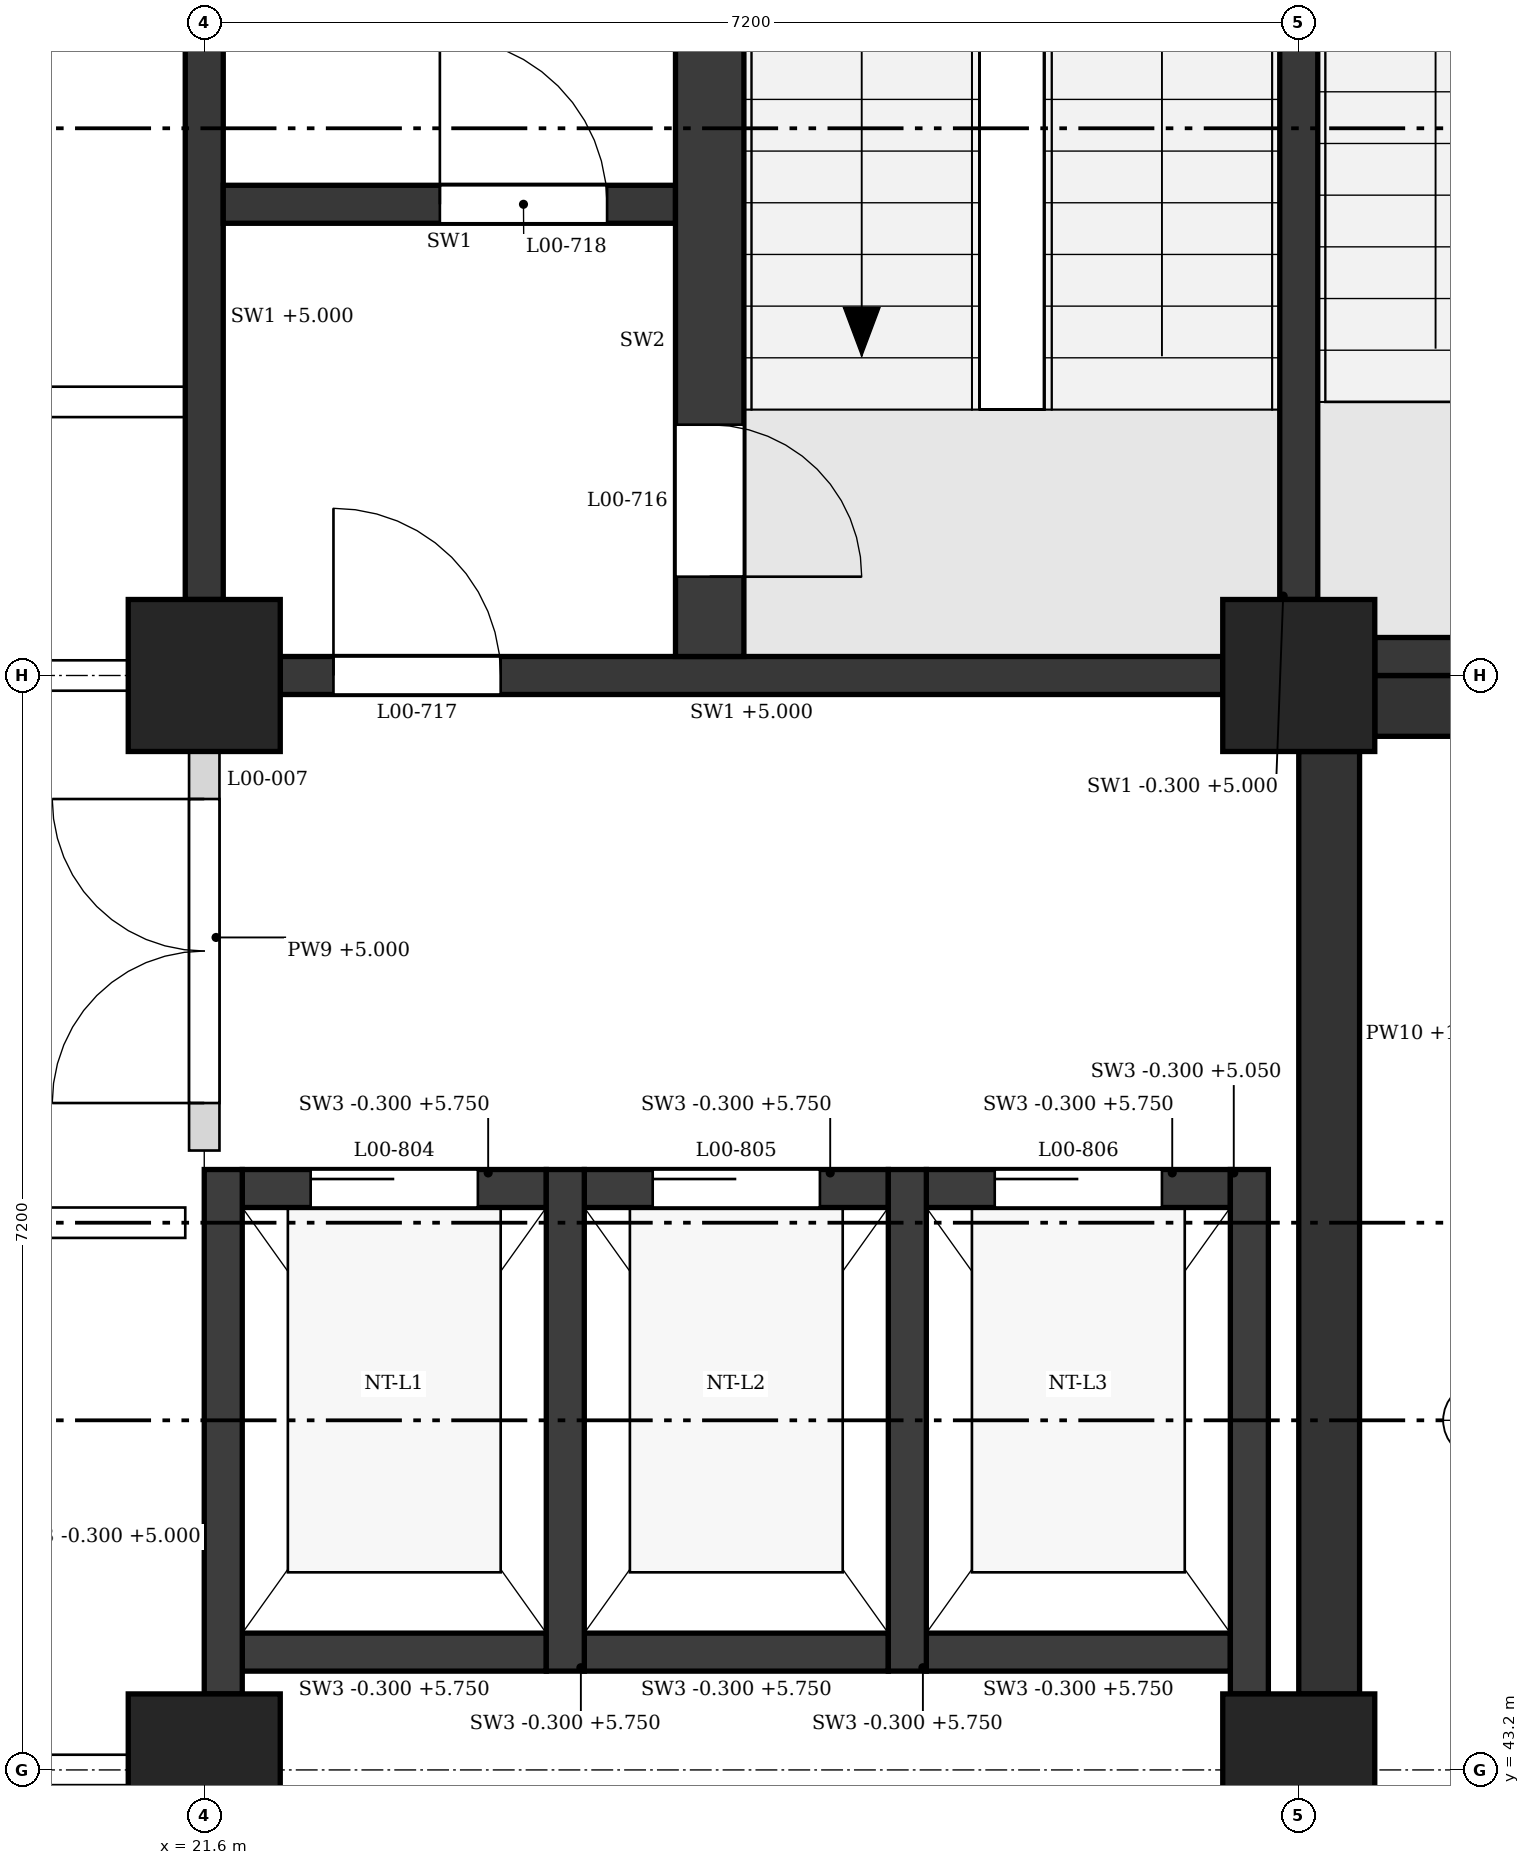
"""IFC4 building model, lengths in metres.
Left out: names, types, materials, properties, quantities, classifications, styles, units other than length and angle.
Written with IfcOpenShell. Run it as: python <this file> out.ifc"""

import sys

from ifc_helpers import new_model, si_unit, direction, frame, frame_2d, origin, origin_2d, place, context, subcontext, project, spatial, polyline, rectangle, outline, extrude, element, fill, save


model = new_model("IFC4")
c1 = context("Model", 3, precision=1e-05, world=origin(), true_north=direction((0.0, 1.0)))
c2 = subcontext(c1, "Body", "Model", "MODEL_VIEW")
j1 = project(units=[si_unit("LENGTHUNIT", "METRE"), si_unit("PLANEANGLEUNIT", "RADIAN")], contexts=[c1])
p1 = place(None, origin())
s1 = spatial("IfcSite", under=j1, at=p1, CompositionType="ELEMENT")
p2 = place(p1, origin())
s2 = spatial("IfcBuilding", under=s1, at=p2, CompositionType="ELEMENT")
p3 = place(p2, origin())
s3 = spatial("IfcBuildingStorey", under=s2, at=p3, CompositionType="ELEMENT", Elevation=0.0)
for number, where, z_axis, x_axis in (
    (1, (21.6, 43.2, 0.0), (0.0, 0.0, 1.0), (1.0, 0.0, 0.0)),
    (2, (21.6, 50.4, 0.0), (0.0, 0.0, 1.0), (1.0, 0.0, 0.0)),
    (3, (28.8, 43.2, 0.0), (0.0, 0.0, 1.0), (1.0, 0.0, 0.0)),
    (4, (28.8, 50.4, 0.0), (0.0, 0.0, 1.0), (1.0, 0.0, 0.0)),
):
    element("IfcColumn", number, at=place(p3, frame(where, z_axis=z_axis, x_axis=x_axis)), inside=s3, PredefinedType="COLUMN", context=c2, shape_type="SweptSolid", body=[
        extrude(rectangle(XDim=1.0, YDim=1.0, at=origin_2d()), origin(), (0.0, 0.0, 1.0), 6.0),
    ])
p4 = place(p3, frame((29.3, 50.525, 0.0), z_axis=(0.0, 0.0, 1.0), x_axis=(1.0, 0.0, 0.0)))
e5 = element("IfcWall", 5, at=p4, inside=s3, PredefinedType="SHEAR", context=c2, shape_type="SweptSolid", body=[
    extrude(rectangle(XDim=6.275, YDim=0.25, at=frame_2d((3.137, 0.0))), origin(), (0.0, 0.0, 1.0), 5.05),
])
p5 = place(p3, frame((28.8, 50.9, -0.3), z_axis=(0.0, 0.0, 1.0), x_axis=(0.0, 1.0, 0.0)))
e6 = element("IfcWall", 6, at=p5, inside=s3, PredefinedType="SHEAR", context=c2, shape_type="SweptSolid", body=[
    extrude(rectangle(XDim=6.2, YDim=0.25, at=frame_2d((3.1, 0.0))), origin(), (0.0, 0.0, 1.0), 5.3),
])
p6 = place(p3, frame((22.1, 50.4, 0.0), z_axis=(0.0, 0.0, 1.0), x_axis=(1.0, 0.0, 0.0)))
e7 = element("IfcWall", 7, at=p6, inside=s3, PredefinedType="SHEAR", context=c2, shape_type="SweptSolid", body=[
    extrude(rectangle(XDim=6.2, YDim=0.25, at=frame_2d((3.1, 0.0))), origin(), (0.0, 0.0, 1.0), 5.0),
])
p7 = place(p6, frame((0.35, 0.0, 0.0)))
e8 = element("IfcOpeningElement", 8, at=p7, cuts=e7, PredefinedType="OPENING", context=c2, shape_type="SweptSolid", body=[
    extrude(rectangle(XDim=1.1, YDim=2.1, at=frame_2d((0.55, 1.05))), frame((0.0, 0.135, 0.0), z_axis=(0.0, -1.0, 0.0), x_axis=(1.0, 0.0, 0.0)), (0.0, 0.0, 1.0), 0.27),
])
p8 = place(p3, frame((21.6, 50.9, 0.0), z_axis=(0.0, 0.0, 1.0), x_axis=(0.0, 1.0, 0.0)))
e9 = element("IfcWall", 9, at=p8, inside=s3, PredefinedType="SHEAR", context=c2, shape_type="SweptSolid", body=[
    extrude(rectangle(XDim=6.2, YDim=0.25, at=frame_2d((3.1, 0.0))), origin(), (0.0, 0.0, 1.0), 5.0),
])
p9 = place(p3, frame((24.925, 50.525, 0.0), z_axis=(0.0, 0.0, 1.0), x_axis=(0.0, 1.0, 0.0)))
e10 = element("IfcWall", 10, at=p9, inside=s3, PredefinedType="SHEAR", context=c2, shape_type="SweptSolid", body=[
    extrude(rectangle(XDim=6.925, YDim=0.45, at=frame_2d((3.462, 0.0))), origin(), (0.0, 0.0, 1.0), 5.75),
])
p10 = place(p9, frame((0.525, 0.0, 0.0)))
e11 = element("IfcOpeningElement", 11, at=p10, cuts=e10, PredefinedType="OPENING", context=c2, shape_type="SweptSolid", body=[
    extrude(rectangle(XDim=1.0, YDim=2.1, at=frame_2d((0.5, 1.05))), frame((0.0, 0.235, 0.0), z_axis=(0.0, -1.0, 0.0), x_axis=(1.0, 0.0, 0.0)), (0.0, 0.0, 1.0), 0.47),
])
p11 = place(p3, frame((21.725, 53.5, 0.0), z_axis=(0.0, 0.0, 1.0), x_axis=(1.0, 0.0, 0.0)))
e12 = element("IfcWall", 12, at=p11, inside=s3, PredefinedType="SHEAR", context=c2, shape_type="SweptSolid", body=[
    extrude(rectangle(XDim=2.975, YDim=0.25, at=frame_2d((1.487, 0.0))), origin(), (0.0, 0.0, 1.0), 5.75),
])
p12 = place(p11, frame((1.425, 0.0, 0.0)))
e13 = element("IfcOpeningElement", 13, at=p12, cuts=e12, PredefinedType="OPENING", context=c2, shape_type="SweptSolid", body=[
    extrude(rectangle(XDim=1.1, YDim=2.1, at=frame_2d((0.55, 1.05))), frame((0.0, 0.135, 0.0), z_axis=(0.0, -1.0, 0.0), x_axis=(1.0, 0.0, 0.0)), (0.0, 0.0, 1.0), 0.27),
])
p13 = place(p3, frame((21.725, 43.7, -0.3), z_axis=(0.0, 0.0, 1.0), x_axis=(0.0, 1.0, 0.0)))
e14 = element("IfcWall", 14, at=p13, inside=s3, PredefinedType="SHEAR", context=c2, shape_type="SweptSolid", body=[
    extrude(rectangle(XDim=3.45, YDim=0.25, at=frame_2d((1.725, 0.0))), origin(), (0.0, 0.0, 1.0), 5.3),
])
for number, where, z_axis, x_axis in (
    (15, (23.975, 43.85, -0.3), (0.0, 0.0, 1.0), (0.0, 1.0, 0.0)),
    (16, (26.225, 43.85, -0.3), (0.0, 0.0, 1.0), (0.0, 1.0, 0.0)),
):
    element("IfcWall", number, at=place(p3, frame(where, z_axis=z_axis, x_axis=x_axis)), inside=s3, PredefinedType="SHEAR", context=c2, shape_type="SweptSolid", body=[
        extrude(rectangle(XDim=3.3, YDim=0.25, at=frame_2d((1.65, 0.0))), origin(), (0.0, 0.0, 1.0), 6.05),
    ])
p14 = place(p3, frame((28.475, 43.7, -0.3), z_axis=(0.0, 0.0, 1.0), x_axis=(0.0, 1.0, 0.0)))
e17 = element("IfcWall", 17, at=p14, inside=s3, PredefinedType="SHEAR", context=c2, shape_type="SweptSolid", body=[
    extrude(rectangle(XDim=3.45, YDim=0.25, at=frame_2d((1.725, 0.0))), origin(), (0.0, 0.0, 1.0), 5.35),
])
p15 = place(p3, frame((21.85, 47.025, -0.3), z_axis=(0.0, 0.0, 1.0), x_axis=(1.0, 0.0, 0.0)))
e18 = element("IfcWall", 18, at=p15, inside=s3, PredefinedType="SHEAR", context=c2, shape_type="SweptSolid", body=[
    extrude(rectangle(XDim=2.0, YDim=0.25, at=frame_2d((1.0, 0.0))), origin(), (0.0, 0.0, 1.0), 6.05),
])
p16 = place(p15, frame((0.45, 0.0, 0.3)))
e19 = element("IfcOpeningElement", 19, at=p16, cuts=e18, PredefinedType="OPENING", context=c2, shape_type="SweptSolid", body=[
    extrude(rectangle(XDim=1.1, YDim=2.1, at=frame_2d((0.55, 1.05))), frame((0.0, 0.135, 0.0), z_axis=(0.0, -1.0, 0.0), x_axis=(1.0, 0.0, 0.0)), (0.0, 0.0, 1.0), 0.27),
])
p17 = place(p3, frame((21.85, 43.975, -0.3), z_axis=(0.0, 0.0, 1.0), x_axis=(1.0, 0.0, 0.0)))
e20 = element("IfcWall", 20, at=p17, inside=s3, PredefinedType="SHEAR", context=c2, shape_type="SweptSolid", body=[
    extrude(rectangle(XDim=2.0, YDim=0.25, at=frame_2d((1.0, 0.0))), origin(), (0.0, 0.0, 1.0), 6.05),
])
p18 = place(p3, frame((24.1, 47.025, -0.3), z_axis=(0.0, 0.0, 1.0), x_axis=(1.0, 0.0, 0.0)))
e21 = element("IfcWall", 21, at=p18, inside=s3, PredefinedType="SHEAR", context=c2, shape_type="SweptSolid", body=[
    extrude(rectangle(XDim=2.0, YDim=0.25, at=frame_2d((1.0, 0.0))), origin(), (0.0, 0.0, 1.0), 6.05),
])
p19 = place(p18, frame((0.45, 0.0, 0.3)))
e22 = element("IfcOpeningElement", 22, at=p19, cuts=e21, PredefinedType="OPENING", context=c2, shape_type="SweptSolid", body=[
    extrude(rectangle(XDim=1.1, YDim=2.1, at=frame_2d((0.55, 1.05))), frame((0.0, 0.135, 0.0), z_axis=(0.0, -1.0, 0.0), x_axis=(1.0, 0.0, 0.0)), (0.0, 0.0, 1.0), 0.27),
])
p20 = place(p3, frame((24.1, 43.975, -0.3), z_axis=(0.0, 0.0, 1.0), x_axis=(1.0, 0.0, 0.0)))
e23 = element("IfcWall", 23, at=p20, inside=s3, PredefinedType="SHEAR", context=c2, shape_type="SweptSolid", body=[
    extrude(rectangle(XDim=2.0, YDim=0.25, at=frame_2d((1.0, 0.0))), origin(), (0.0, 0.0, 1.0), 6.05),
])
p21 = place(p3, frame((26.35, 47.025, -0.3), z_axis=(0.0, 0.0, 1.0), x_axis=(1.0, 0.0, 0.0)))
e24 = element("IfcWall", 24, at=p21, inside=s3, PredefinedType="SHEAR", context=c2, shape_type="SweptSolid", body=[
    extrude(rectangle(XDim=2.0, YDim=0.25, at=frame_2d((1.0, 0.0))), origin(), (0.0, 0.0, 1.0), 6.05),
])
p22 = place(p21, frame((0.45, 0.0, 0.3)))
e25 = element("IfcOpeningElement", 25, at=p22, cuts=e24, PredefinedType="OPENING", context=c2, shape_type="SweptSolid", body=[
    extrude(rectangle(XDim=1.1, YDim=2.1, at=frame_2d((0.55, 1.05))), frame((0.0, 0.135, 0.0), z_axis=(0.0, -1.0, 0.0), x_axis=(1.0, 0.0, 0.0)), (0.0, 0.0, 1.0), 0.27),
])
p23 = place(p3, frame((26.35, 43.975, -0.3), z_axis=(0.0, 0.0, 1.0), x_axis=(1.0, 0.0, 0.0)))
e26 = element("IfcWall", 26, at=p23, inside=s3, PredefinedType="SHEAR", context=c2, shape_type="SweptSolid", body=[
    extrude(rectangle(XDim=2.0, YDim=0.25, at=frame_2d((1.0, 0.0))), origin(), (0.0, 0.0, 1.0), 6.05),
])
p24 = place(p3, frame((18.1, 43.2, 0.0), z_axis=(0.0, 0.0, 1.0), x_axis=(1.0, 0.0, 0.0)))
e27 = element("IfcWall", 27, at=p24, inside=s3, PredefinedType="PARTITIONING", context=c2, shape_type="SweptSolid", body=[
    extrude(rectangle(XDim=3.0, YDim=0.2, at=frame_2d((1.5, 0.0))), origin(), (0.0, 0.0, 1.0), 5.0),
])
p25 = place(p3, frame((17.9, 46.8, 0.0), z_axis=(0.0, 0.0, 1.0), x_axis=(1.0, 0.0, 0.0)))
e28 = element("IfcWall", 28, at=p25, inside=s3, PredefinedType="PARTITIONING", context=c2, shape_type="SweptSolid", body=[
    extrude(outline(polyline([(0.0, 0.0), (3.575, 0.0), (3.575, 5.0), (3.45, 5.0), (3.45, 5.75), (0.0, 5.75), (0.0, 0.0)])), frame((0.0, 0.1, 0.0), z_axis=(0.0, -1.0, 0.0), x_axis=(1.0, 0.0, 0.0)), (0.0, 0.0, 1.0), 0.2),
])
p26 = place(p25, frame((1.338, 0.0, 0.0)))
e29 = element("IfcOpeningElement", 29, at=p26, cuts=e28, PredefinedType="OPENING", context=c2, shape_type="SweptSolid", body=[
    extrude(rectangle(XDim=1.0, YDim=2.1, at=frame_2d((0.5, 1.05))), frame((0.0, 0.11, 0.0), z_axis=(0.0, -1.0, 0.0), x_axis=(1.0, 0.0, 0.0)), (0.0, 0.0, 1.0), 0.22),
])
p27 = place(p3, frame((29.3, 50.2, 0.0), z_axis=(0.0, 0.0, 1.0), x_axis=(1.0, 0.0, 0.0)))
e30 = element("IfcWall", 30, at=p27, inside=s3, PredefinedType="SOLIDWALL", context=c2, shape_type="SweptSolid", body=[
    extrude(rectangle(XDim=6.275, YDim=0.4, at=frame_2d((3.137, 0.0))), origin(), (0.0, 0.0, 1.0), 10.7),
])
p28 = place(p3, frame((14.9, 50.4, 0.0), z_axis=(0.0, 0.0, 1.0), x_axis=(1.0, 0.0, 0.0)))
e31 = element("IfcWall", 31, at=p28, inside=s3, PredefinedType="PARTITIONING", context=c2, shape_type="SweptSolid", body=[
    extrude(rectangle(XDim=6.2, YDim=0.2, at=frame_2d((3.1, 0.0))), origin(), (0.0, 0.0, 1.0), 5.0),
])
p29 = place(p28, frame((2.6, 0.0, 0.0)))
e32 = element("IfcOpeningElement", 32, at=p29, cuts=e31, PredefinedType="OPENING", context=c2, shape_type="SweptSolid", body=[
    extrude(rectangle(XDim=1.0, YDim=2.1, at=frame_2d((0.5, 1.05))), frame((0.0, 0.11, 0.0), z_axis=(0.0, -1.0, 0.0), x_axis=(1.0, 0.0, 0.0)), (0.0, 0.0, 1.0), 0.22),
])
p30 = place(p3, frame((14.5, 52.2, 0.0), z_axis=(0.0, 0.0, 1.0), x_axis=(1.0, 0.0, 0.0)))
e33 = element("IfcWall", 33, at=p30, inside=s3, PredefinedType="PARTITIONING", context=c2, shape_type="SweptSolid", body=[
    extrude(outline(polyline([(0.0, 0.0), (6.975, 0.0), (6.975, 5.0), (6.85, 5.0), (6.85, 5.75), (0.15, 5.75), (0.15, 5.0), (0.0, 5.0), (0.0, 0.0)])), frame((0.0, 0.1, 0.0), z_axis=(0.0, -1.0, 0.0), x_axis=(1.0, 0.0, 0.0)), (0.0, 0.0, 1.0), 0.2),
])
p31 = place(p30, frame((1.25, 0.0, 0.0)))
e34 = element("IfcOpeningElement", 34, at=p31, cuts=e33, PredefinedType="OPENING", context=c2, shape_type="SweptSolid", body=[
    extrude(rectangle(XDim=1.0, YDim=2.1, at=frame_2d((0.5, 1.05))), frame((0.0, 0.11, 0.0), z_axis=(0.0, -1.0, 0.0), x_axis=(1.0, 0.0, 0.0)), (0.0, 0.0, 1.0), 0.22),
])
p32 = place(p30, frame((4.738, 0.0, 0.0)))
e35 = element("IfcOpeningElement", 35, at=p32, cuts=e33, PredefinedType="OPENING", context=c2, shape_type="SweptSolid", body=[
    extrude(rectangle(XDim=1.0, YDim=2.1, at=frame_2d((0.5, 1.05))), frame((0.0, 0.11, 0.0), z_axis=(0.0, -1.0, 0.0), x_axis=(1.0, 0.0, 0.0)), (0.0, 0.0, 1.0), 0.22),
])
p33 = place(p3, frame((21.6, 47.275, 0.0), z_axis=(0.0, 0.0, 1.0), x_axis=(0.0, 1.0, 0.0)))
e36 = element("IfcWall", 36, at=p33, inside=s3, PredefinedType="PARTITIONING", context=c2, shape_type="SweptSolid", body=[
    extrude(rectangle(XDim=2.625, YDim=0.2, at=frame_2d((1.312, 0.0))), origin(), (0.0, 0.0, 1.0), 5.0),
])
p34 = place(p33, frame((0.312, 0.0, 0.0)))
e37 = element("IfcOpeningElement", 37, at=p34, cuts=e36, PredefinedType="OPENING", context=c2, shape_type="SweptSolid", body=[
    extrude(rectangle(XDim=2.0, YDim=2.4, at=frame_2d((1.0, 1.2))), frame((0.0, 0.11, 0.0), z_axis=(0.0, -1.0, 0.0), x_axis=(1.0, 0.0, 0.0)), (0.0, 0.0, 1.0), 0.22),
])
p35 = place(p3, frame((29.0, 43.7, 0.0), z_axis=(0.0, 0.0, 1.0), x_axis=(0.0, 1.0, 0.0)))
e38 = element("IfcWall", 38, at=p35, inside=s3, PredefinedType="SOLIDWALL", context=c2, shape_type="SweptSolid", body=[
    extrude(rectangle(XDim=6.2, YDim=0.4, at=frame_2d((3.1, 0.0))), origin(), (0.0, 0.0, 1.0), 10.55),
])
p36 = place(p10, frame((1.0, 0.0, 0.0), z_axis=(0.0, 0.0, 1.0), x_axis=(-1.0, 0.0, 0.0)))
e39 = element("IfcDoor", 39, at=p36, inside=s3, OperationType="SINGLE_SWING_RIGHT", PredefinedType="DOOR", context=c2, shape_type="SweptSolid", body=[
    extrude(rectangle(XDim=1.0, YDim=2.1, at=frame_2d((0.5, 1.05))), frame((0.0, 0.025, 0.0), z_axis=(0.0, -1.0, 0.0), x_axis=(1.0, 0.0, 0.0)), (0.0, 0.0, 1.0), 0.05),
])
fill(e11, e39)
p37 = place(p7, origin())
e40 = element("IfcDoor", 40, at=p37, inside=s3, OperationType="SINGLE_SWING_LEFT", PredefinedType="DOOR", context=c2, shape_type="SweptSolid", body=[
    extrude(rectangle(XDim=1.1, YDim=2.1, at=frame_2d((0.55, 1.05))), frame((0.0, 0.025, 0.0), z_axis=(0.0, -1.0, 0.0), x_axis=(1.0, 0.0, 0.0)), (0.0, 0.0, 1.0), 0.05),
])
fill(e8, e40)
p38 = place(p12, origin())
e41 = element("IfcDoor", 41, at=p38, inside=s3, OperationType="SINGLE_SWING_LEFT", PredefinedType="DOOR", context=c2, shape_type="SweptSolid", body=[
    extrude(rectangle(XDim=1.1, YDim=2.1, at=frame_2d((0.55, 1.05))), frame((0.0, 0.025, 0.0), z_axis=(0.0, -1.0, 0.0), x_axis=(1.0, 0.0, 0.0)), (0.0, 0.0, 1.0), 0.05),
])
fill(e13, e41)
p39 = place(p16, origin())
e42 = element("IfcDoor", 42, at=p39, inside=s3, OperationType="SLIDING_TO_LEFT", PredefinedType="DOOR", context=c2, shape_type="SweptSolid", body=[
    extrude(rectangle(XDim=1.1, YDim=2.1, at=frame_2d((0.55, 1.05))), frame((0.0, 0.025, 0.0), z_axis=(0.0, -1.0, 0.0), x_axis=(1.0, 0.0, 0.0)), (0.0, 0.0, 1.0), 0.05),
])
fill(e19, e42)
p40 = place(p19, origin())
e43 = element("IfcDoor", 43, at=p40, inside=s3, OperationType="SLIDING_TO_LEFT", PredefinedType="DOOR", context=c2, shape_type="SweptSolid", body=[
    extrude(rectangle(XDim=1.1, YDim=2.1, at=frame_2d((0.55, 1.05))), frame((0.0, 0.025, 0.0), z_axis=(0.0, -1.0, 0.0), x_axis=(1.0, 0.0, 0.0)), (0.0, 0.0, 1.0), 0.05),
])
fill(e22, e43)
p41 = place(p22, origin())
e44 = element("IfcDoor", 44, at=p41, inside=s3, OperationType="SLIDING_TO_LEFT", PredefinedType="DOOR", context=c2, shape_type="SweptSolid", body=[
    extrude(rectangle(XDim=1.1, YDim=2.1, at=frame_2d((0.55, 1.05))), frame((0.0, 0.025, 0.0), z_axis=(0.0, -1.0, 0.0), x_axis=(1.0, 0.0, 0.0)), (0.0, 0.0, 1.0), 0.05),
])
fill(e25, e44)
p42 = place(p34, origin())
e45 = element("IfcDoor", 45, at=p42, inside=s3, OperationType="DOUBLE_DOOR_SINGLE_SWING", PredefinedType="DOOR", context=c2, shape_type="SweptSolid", body=[
    extrude(rectangle(XDim=2.0, YDim=2.4, at=frame_2d((1.0, 1.2))), frame((0.0, 0.025, 0.0), z_axis=(0.0, -1.0, 0.0), x_axis=(1.0, 0.0, 0.0)), (0.0, 0.0, 1.0), 0.05),
])
fill(e37, e45)
save(model, sys.argv[1])
